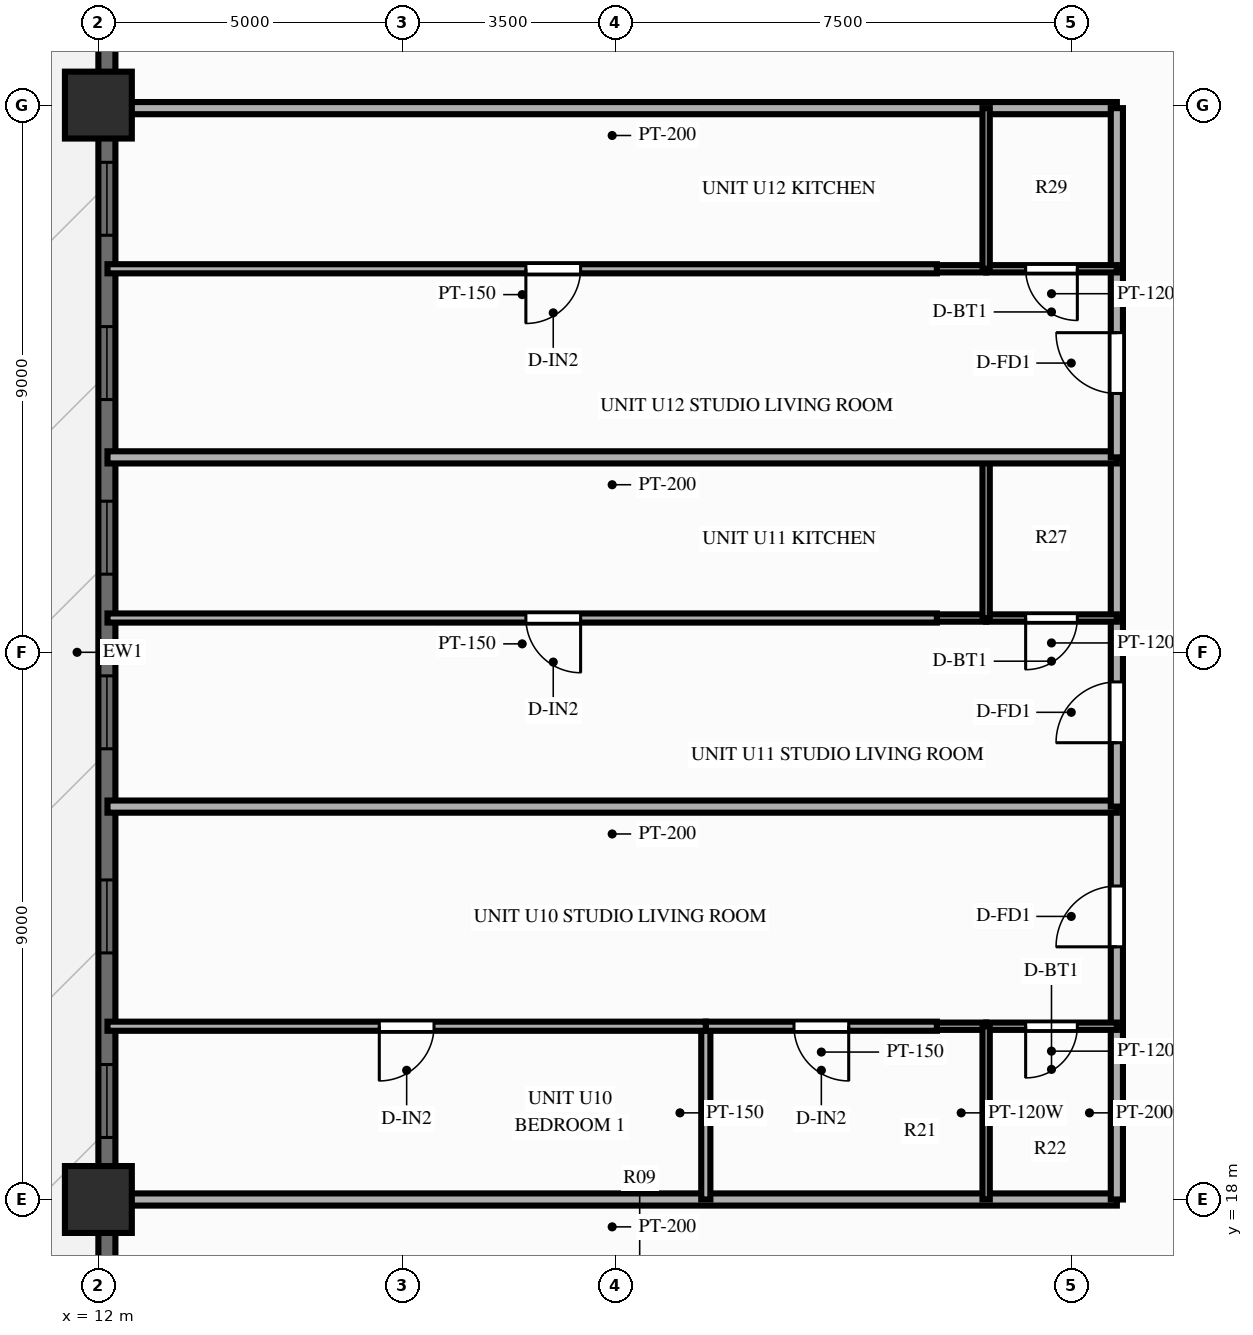
"""IFC4 building model, lengths in metres.
Left out: names, types, materials, properties, quantities, classifications, styles, units other than length and angle.
Written with IfcOpenShell. Run it as: python <this file> out.ifc"""

import sys

from ifc_helpers import new_model, si_unit, direction, frame, frame_2d, origin, origin_2d, place, context, subcontext, project, spatial, rectangle, extrude, source, transform, mapped, element, fill, save


model = new_model("IFC4")
c1 = context("Model", 3, precision=1e-05, world=origin(), true_north=direction((0.0, 1.0)))
c2 = subcontext(c1, "Body", "Model", "MODEL_VIEW")
j1 = project(units=[si_unit("LENGTHUNIT", "METRE"), si_unit("PLANEANGLEUNIT", "RADIAN")], contexts=[c1])
p1 = place(None, origin())
s1 = spatial("IfcSite", under=j1, at=p1, CompositionType="ELEMENT")
p2 = place(p1, origin())
s2 = spatial("IfcBuilding", under=s1, at=p2, CompositionType="ELEMENT")
p3 = place(p2, frame((0.0, 0.0, 61.4)))
s3 = spatial("IfcBuildingStorey", under=s2, at=p3, CompositionType="ELEMENT", Elevation=61.4)
m1 = source(origin(), c2, "Body", "SweptSolid", [
    extrude(rectangle(XDim=1.1, YDim=1.1, at=origin_2d()), origin(), (0.0, 0.0, 1.0), 3.0),
])
for number, where, z_axis, x_axis in (
    (1, (12.0, 36.0, 0.0), (0.0, 0.0, 1.0), (1.0, 0.0, 0.0)),
    (2, (12.0, 18.0, 0.0), (0.0, 0.0, 1.0), (1.0, 0.0, 0.0)),
):
    element("IfcColumn", number, at=place(p3, frame(where, z_axis=z_axis, x_axis=x_axis)), inside=s3, PredefinedType="COLUMN", context=c2, shape_type="MappedRepresentation", body=[
        mapped(m1, transform((0.0, 0.0, 0.0), scale=1.0)),
    ])
p4 = place(p3, frame((12.14, 6.5, 0.0), z_axis=(0.0, 0.0, 1.0), x_axis=(0.0, 1.0, 0.0)))
e3 = element("IfcWall", 3, at=p4, inside=s3, PredefinedType="SOLIDWALL", context=c2, shape_type="SweptSolid", body=[
    extrude(rectangle(XDim=41.0, YDim=0.28, at=frame_2d((20.5, 0.0))), origin(), (0.0, 0.0, 1.0), 2.28),
])
p5 = place(p4, frame((5.15, 0.0, 0.25)))
e4 = element("IfcOpeningElement", 4, at=p5, cuts=e3, PredefinedType="OPENING", context=c2, shape_type="SweptSolid", body=[
    extrude(rectangle(XDim=1.2, YDim=1.5, at=frame_2d((0.6, 0.75))), frame((0.0, 0.152, 0.0), z_axis=(0.0, -1.0, 0.0), x_axis=(1.0, 0.0, 0.0)), (0.0, 0.0, 1.0), 0.304),
])
p6 = place(p4, frame((12.52, 0.0, 0.25)))
e5 = element("IfcOpeningElement", 5, at=p6, cuts=e3, PredefinedType="OPENING", context=c2, shape_type="SweptSolid", body=[
    extrude(rectangle(XDim=1.2, YDim=1.5, at=frame_2d((0.6, 0.75))), frame((0.0, 0.152, 0.0), z_axis=(0.0, -1.0, 0.0), x_axis=(1.0, 0.0, 0.0)), (0.0, 0.0, 1.0), 0.304),
])
p7 = place(p4, frame((15.556, 0.0, 0.25)))
e6 = element("IfcOpeningElement", 6, at=p7, cuts=e3, PredefinedType="OPENING", context=c2, shape_type="SweptSolid", body=[
    extrude(rectangle(XDim=1.2, YDim=1.5, at=frame_2d((0.6, 0.75))), frame((0.0, 0.152, 0.0), z_axis=(0.0, -1.0, 0.0), x_axis=(1.0, 0.0, 0.0)), (0.0, 0.0, 1.0), 0.304),
])
p8 = place(p4, frame((18.913, 0.0, 0.25)))
e7 = element("IfcOpeningElement", 7, at=p8, cuts=e3, PredefinedType="OPENING", context=c2, shape_type="SweptSolid", body=[
    extrude(rectangle(XDim=1.2, YDim=1.5, at=frame_2d((0.6, 0.75))), frame((0.0, 0.152, 0.0), z_axis=(0.0, -1.0, 0.0), x_axis=(1.0, 0.0, 0.0)), (0.0, 0.0, 1.0), 0.304),
])
p9 = place(p4, frame((21.785, 0.0, 0.25)))
e8 = element("IfcOpeningElement", 8, at=p9, cuts=e3, PredefinedType="OPENING", context=c2, shape_type="SweptSolid", body=[
    extrude(rectangle(XDim=1.2, YDim=1.5, at=frame_2d((0.6, 0.75))), frame((0.0, 0.152, 0.0), z_axis=(0.0, -1.0, 0.0), x_axis=(1.0, 0.0, 0.0)), (0.0, 0.0, 1.0), 0.304),
])
p10 = place(p4, frame((24.657, 0.0, 0.25)))
e9 = element("IfcOpeningElement", 9, at=p10, cuts=e3, PredefinedType="OPENING", context=c2, shape_type="SweptSolid", body=[
    extrude(rectangle(XDim=1.2, YDim=1.5, at=frame_2d((0.6, 0.75))), frame((0.0, 0.152, 0.0), z_axis=(0.0, -1.0, 0.0), x_axis=(1.0, 0.0, 0.0)), (0.0, 0.0, 1.0), 0.304),
])
p11 = place(p4, frame((27.359, 0.0, 0.25)))
e10 = element("IfcOpeningElement", 10, at=p11, cuts=e3, PredefinedType="OPENING", context=c2, shape_type="SweptSolid", body=[
    extrude(rectangle(XDim=1.2, YDim=1.5, at=frame_2d((0.6, 0.75))), frame((0.0, 0.152, 0.0), z_axis=(0.0, -1.0, 0.0), x_axis=(1.0, 0.0, 0.0)), (0.0, 0.0, 1.0), 0.304),
])
p12 = place(p4, frame((34.45, 0.0, 0.0)))
e11 = element("IfcOpeningElement", 11, at=p12, cuts=e3, PredefinedType="OPENING", context=c2, shape_type="SweptSolid", body=[
    extrude(rectangle(XDim=1.6, YDim=2.15, at=frame_2d((0.8, 1.075))), frame((0.0, 0.152, 0.0), z_axis=(0.0, -1.0, 0.0), x_axis=(1.0, 0.0, 0.0)), (0.0, 0.0, 1.0), 0.304),
])
for number, where, z_axis, x_axis in (
    (12, (28.75, 18.0, 0.0), (0.0, 0.0, 1.0), (-1.0, 0.0, 0.0)),
    (13, (28.75, 35.95, 0.0), (0.0, 0.0, 1.0), (-1.0, 0.0, 0.0)),
):
    element("IfcWall", number, at=place(p3, frame(where, z_axis=z_axis, x_axis=x_axis)), inside=s3, PredefinedType="PARTITIONING", context=c2, shape_type="SweptSolid", body=[
        extrude(rectangle(XDim=16.6, YDim=0.2, at=frame_2d((8.3, 0.0))), origin(), (0.0, 0.0, 1.0), 2.24),
    ])
p13 = place(p3, frame((28.75, 18.0, 0.0), z_axis=(0.0, 0.0, 1.0), x_axis=(0.0, 1.0, 0.0)))
e14 = element("IfcWall", 14, at=p13, inside=s3, PredefinedType="PARTITIONING", context=c2, shape_type="SweptSolid", body=[
    extrude(rectangle(XDim=2.85, YDim=0.2, at=frame_2d((1.425, 0.0))), origin(), (0.0, 0.0, 1.0), 2.79),
])
p14 = place(p3, frame((28.75, 20.85, 0.0), z_axis=(0.0, 0.0, 1.0), x_axis=(0.0, 1.0, 0.0)))
e15 = element("IfcWall", 15, at=p14, inside=s3, PredefinedType="PARTITIONING", context=c2, shape_type="SweptSolid", body=[
    extrude(rectangle(XDim=3.612, YDim=0.2, at=frame_2d((1.806, 0.0))), origin(), (0.0, 0.0, 1.0), 2.79),
])
p15 = place(p14, frame((1.306, 0.0, 0.0)))
e16 = element("IfcOpeningElement", 16, at=p15, cuts=e15, PredefinedType="OPENING", context=c2, shape_type="SweptSolid", body=[
    extrude(rectangle(XDim=1.0, YDim=2.15, at=frame_2d((0.5, 1.075))), frame((0.0, 0.112, 0.0), z_axis=(0.0, -1.0, 0.0), x_axis=(1.0, 0.0, 0.0)), (0.0, 0.0, 1.0), 0.224),
])
p16 = place(p3, frame((28.75, 20.85, 0.0), z_axis=(0.0, 0.0, 1.0), x_axis=(-1.0, 0.0, 0.0)))
e17 = element("IfcWall", 17, at=p16, inside=s3, PredefinedType="PARTITIONING", context=c2, shape_type="SweptSolid", body=[
    extrude(rectangle(XDim=2.15, YDim=0.12, at=frame_2d((1.075, 0.0))), origin(), (0.0, 0.0, 1.0), 2.79),
])
p17 = place(p16, frame((0.65, 0.0, 0.0)))
e18 = element("IfcOpeningElement", 18, at=p17, cuts=e17, PredefinedType="OPENING", context=c2, shape_type="SweptSolid", body=[
    extrude(rectangle(XDim=0.85, YDim=2.05, at=frame_2d((0.425, 1.025))), frame((0.0, 0.072, 0.0), z_axis=(0.0, -1.0, 0.0), x_axis=(1.0, 0.0, 0.0)), (0.0, 0.0, 1.0), 0.144),
])
p18 = place(p3, frame((26.6, 20.85, 0.0), z_axis=(0.0, 0.0, 1.0), x_axis=(-1.0, 0.0, 0.0)))
e19 = element("IfcWall", 19, at=p18, inside=s3, PredefinedType="PARTITIONING", context=c2, shape_type="SweptSolid", body=[
    extrude(rectangle(XDim=0.81, YDim=0.12, at=frame_2d((0.405, 0.0))), origin(), (0.0, 0.0, 1.0), 2.79),
])
p19 = place(p3, frame((26.6, 18.0, 0.0), z_axis=(0.0, 0.0, 1.0), x_axis=(0.0, 1.0, 0.0)))
e20 = element("IfcWall", 20, at=p19, inside=s3, PredefinedType="PARTITIONING", context=c2, shape_type="SweptSolid", body=[
    extrude(rectangle(XDim=2.85, YDim=0.12, at=frame_2d((1.425, 0.0))), origin(), (0.0, 0.0, 1.0), 2.79),
])
p20 = place(p3, frame((21.99, 18.0, 0.0), z_axis=(0.0, 0.0, 1.0), x_axis=(0.0, 1.0, 0.0)))
e21 = element("IfcWall", 21, at=p20, inside=s3, PredefinedType="PARTITIONING", context=c2, shape_type="SweptSolid", body=[
    extrude(rectangle(XDim=2.85, YDim=0.15, at=frame_2d((1.425, 0.0))), origin(), (0.0, 0.0, 1.0), 2.44),
])
p21 = place(p3, frame((25.79, 20.85, 0.0), z_axis=(0.0, 0.0, 1.0), x_axis=(-1.0, 0.0, 0.0)))
e22 = element("IfcWall", 22, at=p21, inside=s3, PredefinedType="PARTITIONING", context=c2, shape_type="SweptSolid", body=[
    extrude(rectangle(XDim=3.8, YDim=0.15, at=frame_2d((1.9, 0.0))), origin(), (0.0, 0.0, 1.0), 2.79),
])
p22 = place(p21, frame((1.45, 0.0, 0.0)))
e23 = element("IfcOpeningElement", 23, at=p22, cuts=e22, PredefinedType="OPENING", context=c2, shape_type="SweptSolid", body=[
    extrude(rectangle(XDim=0.9, YDim=2.1, at=frame_2d((0.45, 1.05))), frame((0.0, 0.087, 0.0), z_axis=(0.0, -1.0, 0.0), x_axis=(1.0, 0.0, 0.0)), (0.0, 0.0, 1.0), 0.174),
])
p23 = place(p3, frame((21.99, 20.85, 0.0), z_axis=(0.0, 0.0, 1.0), x_axis=(-1.0, 0.0, 0.0)))
e24 = element("IfcWall", 24, at=p23, inside=s3, PredefinedType="PARTITIONING", context=c2, shape_type="SweptSolid", body=[
    extrude(rectangle(XDim=9.84, YDim=0.15, at=frame_2d((4.92, 0.0))), origin(), (0.0, 0.0, 1.0), 2.79),
])
p24 = place(p23, frame((4.47, 0.0, 0.0)))
e25 = element("IfcOpeningElement", 25, at=p24, cuts=e24, PredefinedType="OPENING", context=c2, shape_type="SweptSolid", body=[
    extrude(rectangle(XDim=0.9, YDim=2.1, at=frame_2d((0.45, 1.05))), frame((0.0, 0.087, 0.0), z_axis=(0.0, -1.0, 0.0), x_axis=(1.0, 0.0, 0.0)), (0.0, 0.0, 1.0), 0.174),
])
p25 = place(p3, frame((28.75, 24.462, 0.0), z_axis=(0.0, 0.0, 1.0), x_axis=(-1.0, 0.0, 0.0)))
e26 = element("IfcWall", 26, at=p25, inside=s3, PredefinedType="PARTITIONING", context=c2, shape_type="SweptSolid", body=[
    extrude(rectangle(XDim=16.6, YDim=0.2, at=frame_2d((8.3, 0.0))), origin(), (0.0, 0.0, 1.0), 2.79),
])
p26 = place(p3, frame((28.75, 24.462, 0.0), z_axis=(0.0, 0.0, 1.0), x_axis=(0.0, 1.0, 0.0)))
e27 = element("IfcWall", 27, at=p26, inside=s3, PredefinedType="PARTITIONING", context=c2, shape_type="SweptSolid", body=[
    extrude(rectangle(XDim=3.102, YDim=0.2, at=frame_2d((1.551, 0.0))), origin(), (0.0, 0.0, 1.0), 2.79),
])
p27 = place(p26, frame((1.051, 0.0, 0.0)))
e28 = element("IfcOpeningElement", 28, at=p27, cuts=e27, PredefinedType="OPENING", context=c2, shape_type="SweptSolid", body=[
    extrude(rectangle(XDim=1.0, YDim=2.15, at=frame_2d((0.5, 1.075))), frame((0.0, 0.112, 0.0), z_axis=(0.0, -1.0, 0.0), x_axis=(1.0, 0.0, 0.0)), (0.0, 0.0, 1.0), 0.224),
])
p28 = place(p3, frame((28.75, 27.564, 0.0), z_axis=(0.0, 0.0, 1.0), x_axis=(0.0, 1.0, 0.0)))
e29 = element("IfcWall", 29, at=p28, inside=s3, PredefinedType="PARTITIONING", context=c2, shape_type="SweptSolid", body=[
    extrude(rectangle(XDim=2.642, YDim=0.2, at=frame_2d((1.321, 0.0))), origin(), (0.0, 0.0, 1.0), 2.79),
])
p29 = place(p3, frame((28.75, 27.564, 0.0), z_axis=(0.0, 0.0, 1.0), x_axis=(-1.0, 0.0, 0.0)))
e30 = element("IfcWall", 30, at=p29, inside=s3, PredefinedType="PARTITIONING", context=c2, shape_type="SweptSolid", body=[
    extrude(rectangle(XDim=2.15, YDim=0.12, at=frame_2d((1.075, 0.0))), origin(), (0.0, 0.0, 1.0), 2.79),
])
p30 = place(p29, frame((0.65, 0.0, 0.0)))
e31 = element("IfcOpeningElement", 31, at=p30, cuts=e30, PredefinedType="OPENING", context=c2, shape_type="SweptSolid", body=[
    extrude(rectangle(XDim=0.85, YDim=2.05, at=frame_2d((0.425, 1.025))), frame((0.0, 0.072, 0.0), z_axis=(0.0, -1.0, 0.0), x_axis=(1.0, 0.0, 0.0)), (0.0, 0.0, 1.0), 0.144),
])
p31 = place(p3, frame((26.6, 27.564, 0.0), z_axis=(0.0, 0.0, 1.0), x_axis=(-1.0, 0.0, 0.0)))
e32 = element("IfcWall", 32, at=p31, inside=s3, PredefinedType="PARTITIONING", context=c2, shape_type="SweptSolid", body=[
    extrude(rectangle(XDim=0.81, YDim=0.12, at=frame_2d((0.405, 0.0))), origin(), (0.0, 0.0, 1.0), 2.79),
])
p32 = place(p3, frame((26.6, 27.564, 0.0), z_axis=(0.0, 0.0, 1.0), x_axis=(0.0, 1.0, 0.0)))
e33 = element("IfcWall", 33, at=p32, inside=s3, PredefinedType="PARTITIONING", context=c2, shape_type="SweptSolid", body=[
    extrude(rectangle(XDim=2.642, YDim=0.12, at=frame_2d((1.321, 0.0))), origin(), (0.0, 0.0, 1.0), 2.79),
])
p33 = place(p3, frame((25.79, 27.564, 0.0), z_axis=(0.0, 0.0, 1.0), x_axis=(-1.0, 0.0, 0.0)))
e34 = element("IfcWall", 34, at=p33, inside=s3, PredefinedType="PARTITIONING", context=c2, shape_type="SweptSolid", body=[
    extrude(rectangle(XDim=13.64, YDim=0.15, at=frame_2d((6.82, 0.0))), origin(), (0.0, 0.0, 1.0), 2.79),
])
p34 = place(p33, frame((5.859, 0.0, 0.0)))
e35 = element("IfcOpeningElement", 35, at=p34, cuts=e34, PredefinedType="OPENING", context=c2, shape_type="SweptSolid", body=[
    extrude(rectangle(XDim=0.9, YDim=2.1, at=frame_2d((0.45, 1.05))), frame((0.0, 0.087, 0.0), z_axis=(0.0, -1.0, 0.0), x_axis=(1.0, 0.0, 0.0)), (0.0, 0.0, 1.0), 0.174),
])
p35 = place(p3, frame((28.75, 30.206, 0.0), z_axis=(0.0, 0.0, 1.0), x_axis=(-1.0, 0.0, 0.0)))
e36 = element("IfcWall", 36, at=p35, inside=s3, PredefinedType="PARTITIONING", context=c2, shape_type="SweptSolid", body=[
    extrude(rectangle(XDim=16.6, YDim=0.2, at=frame_2d((8.3, 0.0))), origin(), (0.0, 0.0, 1.0), 2.79),
])
p36 = place(p3, frame((28.75, 30.206, 0.0), z_axis=(0.0, 0.0, 1.0), x_axis=(0.0, 1.0, 0.0)))
e37 = element("IfcWall", 37, at=p36, inside=s3, PredefinedType="PARTITIONING", context=c2, shape_type="SweptSolid", body=[
    extrude(rectangle(XDim=3.102, YDim=0.2, at=frame_2d((1.551, 0.0))), origin(), (0.0, 0.0, 1.0), 2.79),
])
p37 = place(p36, frame((1.051, 0.0, 0.0)))
e38 = element("IfcOpeningElement", 38, at=p37, cuts=e37, PredefinedType="OPENING", context=c2, shape_type="SweptSolid", body=[
    extrude(rectangle(XDim=1.0, YDim=2.15, at=frame_2d((0.5, 1.075))), frame((0.0, 0.112, 0.0), z_axis=(0.0, -1.0, 0.0), x_axis=(1.0, 0.0, 0.0)), (0.0, 0.0, 1.0), 0.224),
])
p38 = place(p3, frame((28.75, 33.308, 0.0), z_axis=(0.0, 0.0, 1.0), x_axis=(0.0, 1.0, 0.0)))
e39 = element("IfcWall", 39, at=p38, inside=s3, PredefinedType="PARTITIONING", context=c2, shape_type="SweptSolid", body=[
    extrude(rectangle(XDim=2.642, YDim=0.2, at=frame_2d((1.321, 0.0))), origin(), (0.0, 0.0, 1.0), 2.79),
])
p39 = place(p3, frame((28.75, 33.308, 0.0), z_axis=(0.0, 0.0, 1.0), x_axis=(-1.0, 0.0, 0.0)))
e40 = element("IfcWall", 40, at=p39, inside=s3, PredefinedType="PARTITIONING", context=c2, shape_type="SweptSolid", body=[
    extrude(rectangle(XDim=2.15, YDim=0.12, at=frame_2d((1.075, 0.0))), origin(), (0.0, 0.0, 1.0), 2.79),
])
p40 = place(p39, frame((0.65, 0.0, 0.0)))
e41 = element("IfcOpeningElement", 41, at=p40, cuts=e40, PredefinedType="OPENING", context=c2, shape_type="SweptSolid", body=[
    extrude(rectangle(XDim=0.85, YDim=2.05, at=frame_2d((0.425, 1.025))), frame((0.0, 0.072, 0.0), z_axis=(0.0, -1.0, 0.0), x_axis=(1.0, 0.0, 0.0)), (0.0, 0.0, 1.0), 0.144),
])
p41 = place(p3, frame((26.6, 33.308, 0.0), z_axis=(0.0, 0.0, 1.0), x_axis=(-1.0, 0.0, 0.0)))
e42 = element("IfcWall", 42, at=p41, inside=s3, PredefinedType="PARTITIONING", context=c2, shape_type="SweptSolid", body=[
    extrude(rectangle(XDim=0.81, YDim=0.12, at=frame_2d((0.405, 0.0))), origin(), (0.0, 0.0, 1.0), 2.79),
])
p42 = place(p3, frame((26.6, 33.308, 0.0), z_axis=(0.0, 0.0, 1.0), x_axis=(0.0, 1.0, 0.0)))
e43 = element("IfcWall", 43, at=p42, inside=s3, PredefinedType="PARTITIONING", context=c2, shape_type="SweptSolid", body=[
    extrude(rectangle(XDim=2.642, YDim=0.12, at=frame_2d((1.321, 0.0))), origin(), (0.0, 0.0, 1.0), 2.79),
])
p43 = place(p3, frame((25.79, 33.308, 0.0), z_axis=(0.0, 0.0, 1.0), x_axis=(-1.0, 0.0, 0.0)))
e44 = element("IfcWall", 44, at=p43, inside=s3, PredefinedType="PARTITIONING", context=c2, shape_type="SweptSolid", body=[
    extrude(rectangle(XDim=13.64, YDim=0.15, at=frame_2d((6.82, 0.0))), origin(), (0.0, 0.0, 1.0), 2.79),
])
p44 = place(p43, frame((5.859, 0.0, 0.0)))
e45 = element("IfcOpeningElement", 45, at=p44, cuts=e44, PredefinedType="OPENING", context=c2, shape_type="SweptSolid", body=[
    extrude(rectangle(XDim=0.9, YDim=2.1, at=frame_2d((0.45, 1.05))), frame((0.0, 0.087, 0.0), z_axis=(0.0, -1.0, 0.0), x_axis=(1.0, 0.0, 0.0)), (0.0, 0.0, 1.0), 0.174),
])
m2 = source(origin(), c2, "Body", "SweptSolid", [
    extrude(rectangle(XDim=1.2, YDim=1.5, at=frame_2d((0.6, 0.75))), frame((0.0, 0.03, 0.0), z_axis=(0.0, -1.0, 0.0), x_axis=(1.0, 0.0, 0.0)), (0.0, 0.0, 1.0), 0.06),
])
p45 = place(p6, origin())
e46 = element("IfcWindow", 46, at=p45, inside=s3, PartitioningType="SINGLE_PANEL", PredefinedType="WINDOW", context=c2, shape_type="MappedRepresentation", body=[
    mapped(m2, transform((0.0, 0.0, 0.0), scale=1.0)),
])
fill(e5, e46)
p46 = place(p7, origin())
e47 = element("IfcWindow", 47, at=p46, inside=s3, PartitioningType="SINGLE_PANEL", PredefinedType="WINDOW", context=c2, shape_type="MappedRepresentation", body=[
    mapped(m2, transform((0.0, 0.0, 0.0), scale=1.0)),
])
fill(e6, e47)
p47 = place(p8, origin())
e48 = element("IfcWindow", 48, at=p47, inside=s3, PartitioningType="SINGLE_PANEL", PredefinedType="WINDOW", context=c2, shape_type="MappedRepresentation", body=[
    mapped(m2, transform((0.0, 0.0, 0.0), scale=1.0)),
])
fill(e7, e48)
p48 = place(p9, origin())
e49 = element("IfcWindow", 49, at=p48, inside=s3, PartitioningType="SINGLE_PANEL", PredefinedType="WINDOW", context=c2, shape_type="MappedRepresentation", body=[
    mapped(m2, transform((0.0, 0.0, 0.0), scale=1.0)),
])
fill(e8, e49)
p49 = place(p10, origin())
e50 = element("IfcWindow", 50, at=p49, inside=s3, PartitioningType="SINGLE_PANEL", PredefinedType="WINDOW", context=c2, shape_type="MappedRepresentation", body=[
    mapped(m2, transform((0.0, 0.0, 0.0), scale=1.0)),
])
fill(e9, e50)
p50 = place(p11, origin())
e51 = element("IfcWindow", 51, at=p50, inside=s3, PartitioningType="SINGLE_PANEL", PredefinedType="WINDOW", context=c2, shape_type="MappedRepresentation", body=[
    mapped(m2, transform((0.0, 0.0, 0.0), scale=1.0)),
])
fill(e10, e51)
m3 = source(origin(), c2, "Body", "SweptSolid", [
    extrude(rectangle(XDim=1.0, YDim=2.15, at=frame_2d((0.5, 1.075))), frame((0.0, 0.025, 0.0), z_axis=(0.0, -1.0, 0.0), x_axis=(1.0, 0.0, 0.0)), (0.0, 0.0, 1.0), 0.05),
])
p51 = place(p15, origin())
e52 = element("IfcDoor", 52, at=p51, inside=s3, OperationType="SINGLE_SWING_LEFT", PredefinedType="DOOR", context=c2, shape_type="MappedRepresentation", body=[
    mapped(m3, transform((0.0, 0.0, 0.0), scale=1.0)),
])
fill(e16, e52)
m4 = source(origin(), c2, "Body", "SweptSolid", [
    extrude(rectangle(XDim=0.85, YDim=2.05, at=frame_2d((0.425, 1.025))), frame((0.0, 0.025, 0.0), z_axis=(0.0, -1.0, 0.0), x_axis=(1.0, 0.0, 0.0)), (0.0, 0.0, 1.0), 0.05),
])
p52 = place(p17, origin())
e53 = element("IfcDoor", 53, at=p52, inside=s3, OperationType="SINGLE_SWING_RIGHT", PredefinedType="DOOR", context=c2, shape_type="MappedRepresentation", body=[
    mapped(m4, transform((0.0, 0.0, 0.0), scale=1.0)),
])
fill(e18, e53)
m5 = source(origin(), c2, "Body", "SweptSolid", [
    extrude(rectangle(XDim=0.9, YDim=2.1, at=frame_2d((0.45, 1.05))), frame((0.0, 0.025, 0.0), z_axis=(0.0, -1.0, 0.0), x_axis=(1.0, 0.0, 0.0)), (0.0, 0.0, 1.0), 0.05),
])
p53 = place(p22, origin())
e54 = element("IfcDoor", 54, at=p53, inside=s3, OperationType="SINGLE_SWING_LEFT", PredefinedType="DOOR", context=c2, shape_type="MappedRepresentation", body=[
    mapped(m5, transform((0.0, 0.0, 0.0), scale=1.0)),
])
fill(e23, e54)
p54 = place(p24, origin())
e55 = element("IfcDoor", 55, at=p54, inside=s3, OperationType="SINGLE_SWING_RIGHT", PredefinedType="DOOR", context=c2, shape_type="MappedRepresentation", body=[
    mapped(m5, transform((0.0, 0.0, 0.0), scale=1.0)),
])
fill(e25, e55)
p55 = place(p27, origin())
e56 = element("IfcDoor", 56, at=p55, inside=s3, OperationType="SINGLE_SWING_LEFT", PredefinedType="DOOR", context=c2, shape_type="MappedRepresentation", body=[
    mapped(m3, transform((0.0, 0.0, 0.0), scale=1.0)),
])
fill(e28, e56)
p56 = place(p30, origin())
e57 = element("IfcDoor", 57, at=p56, inside=s3, OperationType="SINGLE_SWING_RIGHT", PredefinedType="DOOR", context=c2, shape_type="MappedRepresentation", body=[
    mapped(m4, transform((0.0, 0.0, 0.0), scale=1.0)),
])
fill(e31, e57)
p57 = place(p34, origin())
e58 = element("IfcDoor", 58, at=p57, inside=s3, OperationType="SINGLE_SWING_LEFT", PredefinedType="DOOR", context=c2, shape_type="MappedRepresentation", body=[
    mapped(m5, transform((0.0, 0.0, 0.0), scale=1.0)),
])
fill(e35, e58)
p58 = place(p37, origin())
e59 = element("IfcDoor", 59, at=p58, inside=s3, OperationType="SINGLE_SWING_RIGHT", PredefinedType="DOOR", context=c2, shape_type="MappedRepresentation", body=[
    mapped(m3, transform((0.0, 0.0, 0.0), scale=1.0)),
])
fill(e38, e59)
p59 = place(p40, origin())
e60 = element("IfcDoor", 60, at=p59, inside=s3, OperationType="SINGLE_SWING_LEFT", PredefinedType="DOOR", context=c2, shape_type="MappedRepresentation", body=[
    mapped(m4, transform((0.0, 0.0, 0.0), scale=1.0)),
])
fill(e41, e60)
p60 = place(p44, origin())
e61 = element("IfcDoor", 61, at=p60, inside=s3, OperationType="SINGLE_SWING_RIGHT", PredefinedType="DOOR", context=c2, shape_type="MappedRepresentation", body=[
    mapped(m5, transform((0.0, 0.0, 0.0), scale=1.0)),
])
fill(e45, e61)
save(model, sys.argv[1])
